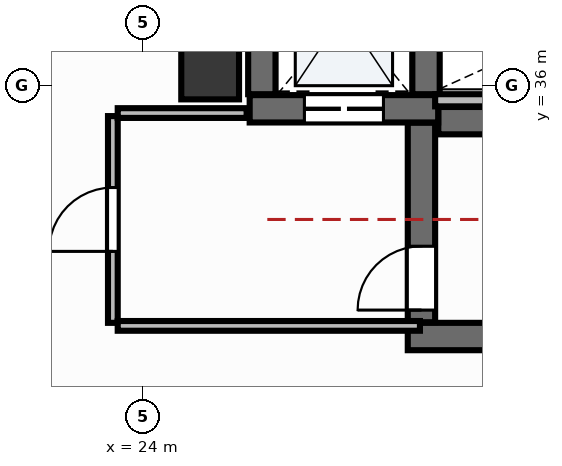
"""IFC4 building model, lengths in metres.
Left out: names, types, materials, properties, quantities, classifications, styles, units other than length and angle.
Written with IfcOpenShell. Run it as: python <this file> out.ifc"""

import sys

from ifc_helpers import new_model, si_unit, direction, frame, frame_2d, origin, origin_2d, place, context, subcontext, project, spatial, rectangle, extrude, element, fill, save


model = new_model("IFC4")
c1 = context("Model", 3, precision=1e-05, world=origin(), true_north=direction((0.0, 1.0)))
c2 = subcontext(c1, "Body", "Model", "MODEL_VIEW")
j1 = project(units=[si_unit("LENGTHUNIT", "METRE"), si_unit("PLANEANGLEUNIT", "RADIAN")], contexts=[c1])
p1 = place(None, origin())
s1 = spatial("IfcSite", under=j1, at=p1, CompositionType="ELEMENT")
p2 = place(p1, origin())
s2 = spatial("IfcBuilding", under=s1, at=p2, CompositionType="ELEMENT")
p3 = place(p2, frame((0.0, 0.0, 10.2)))
s3 = spatial("IfcBuildingStorey", under=s2, at=p3, CompositionType="ELEMENT", Elevation=10.2)
p4 = place(p3, frame((28.852, 35.425, 0.0), z_axis=(0.0, 0.0, 1.0), x_axis=(1.0, 0.0, 0.0)))
e1 = element("IfcWall", 1, at=p4, inside=s3, PredefinedType="SHEAR", context=c2, shape_type="SweptSolid", body=[
    extrude(rectangle(XDim=8.248, YDim=0.45, at=frame_2d((4.124, 0.0))), origin(), (0.0, 0.0, 1.0), 4.45),
])
p5 = place(p3, frame((28.35, 31.875, 0.0), z_axis=(0.0, 0.0, 1.0), x_axis=(1.0, 0.0, 0.0)))
e2 = element("IfcWall", 2, at=p5, inside=s3, PredefinedType="SHEAR", context=c2, shape_type="SweptSolid", body=[
    extrude(rectangle(XDim=8.75, YDim=0.45, at=frame_2d((4.375, 0.0))), origin(), (0.0, 0.0, 1.0), 4.45),
])
p6 = place(p3, frame((28.575, 32.11, 0.0), z_axis=(0.0, 0.0, 1.0), x_axis=(0.0, 1.0, 0.0)))
e3 = element("IfcWall", 3, at=p6, inside=s3, PredefinedType="SHEAR", context=c2, shape_type="SweptSolid", body=[
    extrude(rectangle(XDim=3.283, YDim=0.45, at=frame_2d((1.642, 0.0))), origin(), (0.0, 0.0, 1.0), 4.45),
])
p7 = place(p6, frame((0.2, 0.0, 0.0)))
e4 = element("IfcOpeningElement", 4, at=p7, cuts=e3, PredefinedType="OPENING", context=c2, shape_type="SweptSolid", body=[
    extrude(rectangle(XDim=1.05, YDim=2.15, at=frame_2d((0.525, 1.075))), frame((0.0, 0.24, 0.0), z_axis=(0.0, -1.0, 0.0), x_axis=(1.0, 0.0, 0.0)), (0.0, 0.0, 1.0), 0.48),
])
p8 = place(p3, frame((25.75, 35.62, 0.0), z_axis=(0.0, 0.0, 1.0), x_axis=(1.0, 0.0, 0.0)))
e5 = element("IfcWall", 5, at=p8, inside=s3, PredefinedType="SHEAR", context=c2, shape_type="SweptSolid", body=[
    extrude(rectangle(XDim=3.1, YDim=0.45, at=frame_2d((1.55, 0.0))), origin(), (0.0, 0.0, 1.0), 4.45),
])
p9 = place(p8, frame((0.9, 0.0, 0.0)))
e6 = element("IfcOpeningElement", 6, at=p9, cuts=e5, PredefinedType="OPENING", context=c2, shape_type="SweptSolid", body=[
    extrude(rectangle(XDim=1.3, YDim=2.2, at=frame_2d((0.65, 1.1))), frame((0.0, 0.24, 0.0), z_axis=(0.0, -1.0, 0.0), x_axis=(1.0, 0.0, 0.0)), (0.0, 0.0, 1.0), 0.48),
])
for number, where, z_axis, x_axis in (
    (7, (25.95, 35.86, 0.0), (0.0, 0.0, 1.0), (0.0, 1.0, 0.0)),
    (8, (28.65, 35.86, 0.0), (0.0, 0.0, 1.0), (0.0, 1.0, 0.0)),
):
    element("IfcWall", number, at=place(p3, frame(where, z_axis=z_axis, x_axis=x_axis)), inside=s3, PredefinedType="SHEAR", context=c2, shape_type="SweptSolid", body=[
        extrude(rectangle(XDim=2.7, YDim=0.45, at=frame_2d((1.35, 0.0))), origin(), (0.0, 0.0, 1.0), 4.45),
    ])
p10 = place(p3, frame((25.1, 36.25, -0.0), z_axis=(0.0, 0.0, 1.0), x_axis=(1.0, 0.0, 0.0)))
e9 = element("IfcColumn", 9, at=p10, inside=s3, PredefinedType="PILASTER", context=c2, shape_type="SweptSolid", body=[
    extrude(rectangle(XDim=0.95, YDim=0.95, at=origin_2d()), origin(), (0.0, 0.0, 1.0), 4.451),
])
p11 = place(p3, frame((28.8, 35.76, 0.0), z_axis=(0.0, 0.0, 1.0), x_axis=(1.0, 0.0, 0.0)))
e10 = element("IfcWall", 10, at=p11, inside=s3, PredefinedType="PARTITIONING", context=c2, shape_type="SweptSolid", body=[
    extrude(rectangle(XDim=4.57, YDim=0.2, at=frame_2d((2.285, 0.0))), origin(), (0.0, 0.0, 1.0), 3.46),
])
p12 = place(p3, frame((23.5, 32.1, 0.0), z_axis=(0.0, 0.0, 1.0), x_axis=(0.0, 1.0, 0.0)))
e11 = element("IfcWall", 11, at=p12, inside=s3, PredefinedType="PARTITIONING", context=c2, shape_type="SweptSolid", body=[
    extrude(rectangle(XDim=3.4, YDim=0.16, at=frame_2d((1.7, 0.0))), origin(), (0.0, 0.0, 1.0), 3.46),
])
p13 = place(p12, frame((1.175, 0.0, 0.0)))
e12 = element("IfcOpeningElement", 12, at=p13, cuts=e11, PredefinedType="OPENING", context=c2, shape_type="SweptSolid", body=[
    extrude(rectangle(XDim=1.05, YDim=2.15, at=frame_2d((0.525, 1.075))), frame((0.0, 0.095, 0.0), z_axis=(0.0, -1.0, 0.0), x_axis=(1.0, 0.0, 0.0)), (0.0, 0.0, 1.0), 0.19),
])
p14 = place(p3, frame((23.58, 32.05, 0.0), z_axis=(0.0, 0.0, 1.0), x_axis=(1.0, 0.0, 0.0)))
e13 = element("IfcWall", 13, at=p14, inside=s3, PredefinedType="PARTITIONING", context=c2, shape_type="SweptSolid", body=[
    extrude(rectangle(XDim=4.97, YDim=0.16, at=frame_2d((2.485, 0.0))), origin(), (0.0, 0.0, 1.0), 3.46),
])
p15 = place(p3, frame((23.58, 35.55, 0.0), z_axis=(0.0, 0.0, 1.0), x_axis=(1.0, 0.0, 0.0)))
e14 = element("IfcWall", 14, at=p15, inside=s3, PredefinedType="PARTITIONING", context=c2, shape_type="SweptSolid", body=[
    extrude(rectangle(XDim=2.12, YDim=0.16, at=frame_2d((1.06, 0.0))), origin(), (0.0, 0.0, 1.0), 3.46),
])
p16 = place(p7, origin())
e15 = element("IfcDoor", 15, at=p16, inside=s3, OperationType="SINGLE_SWING_LEFT", PredefinedType="DOOR", context=c2, shape_type="SweptSolid", body=[
    extrude(rectangle(XDim=1.05, YDim=2.15, at=frame_2d((0.525, 1.075))), frame((0.0, 0.025, 0.0), z_axis=(0.0, -1.0, 0.0), x_axis=(1.0, 0.0, 0.0)), (0.0, 0.0, 1.0), 0.05),
])
fill(e4, e15)
p17 = place(p9, origin())
e16 = element("IfcDoor", 16, at=p17, inside=s3, OperationType="DOUBLE_DOOR_SLIDING", PredefinedType="DOOR", context=c2, shape_type="SweptSolid", body=[
    extrude(rectangle(XDim=1.3, YDim=2.2, at=frame_2d((0.65, 1.1))), frame((0.0, 0.025, 0.0), z_axis=(0.0, -1.0, 0.0), x_axis=(1.0, 0.0, 0.0)), (0.0, 0.0, 1.0), 0.05),
])
fill(e6, e16)
p18 = place(p13, origin())
e17 = element("IfcDoor", 17, at=p18, inside=s3, OperationType="SINGLE_SWING_LEFT", PredefinedType="DOOR", context=c2, shape_type="SweptSolid", body=[
    extrude(rectangle(XDim=1.05, YDim=2.15, at=frame_2d((0.525, 1.075))), frame((0.0, 0.025, 0.0), z_axis=(0.0, -1.0, 0.0), x_axis=(1.0, 0.0, 0.0)), (0.0, 0.0, 1.0), 0.05),
])
fill(e12, e17)
save(model, sys.argv[1])
